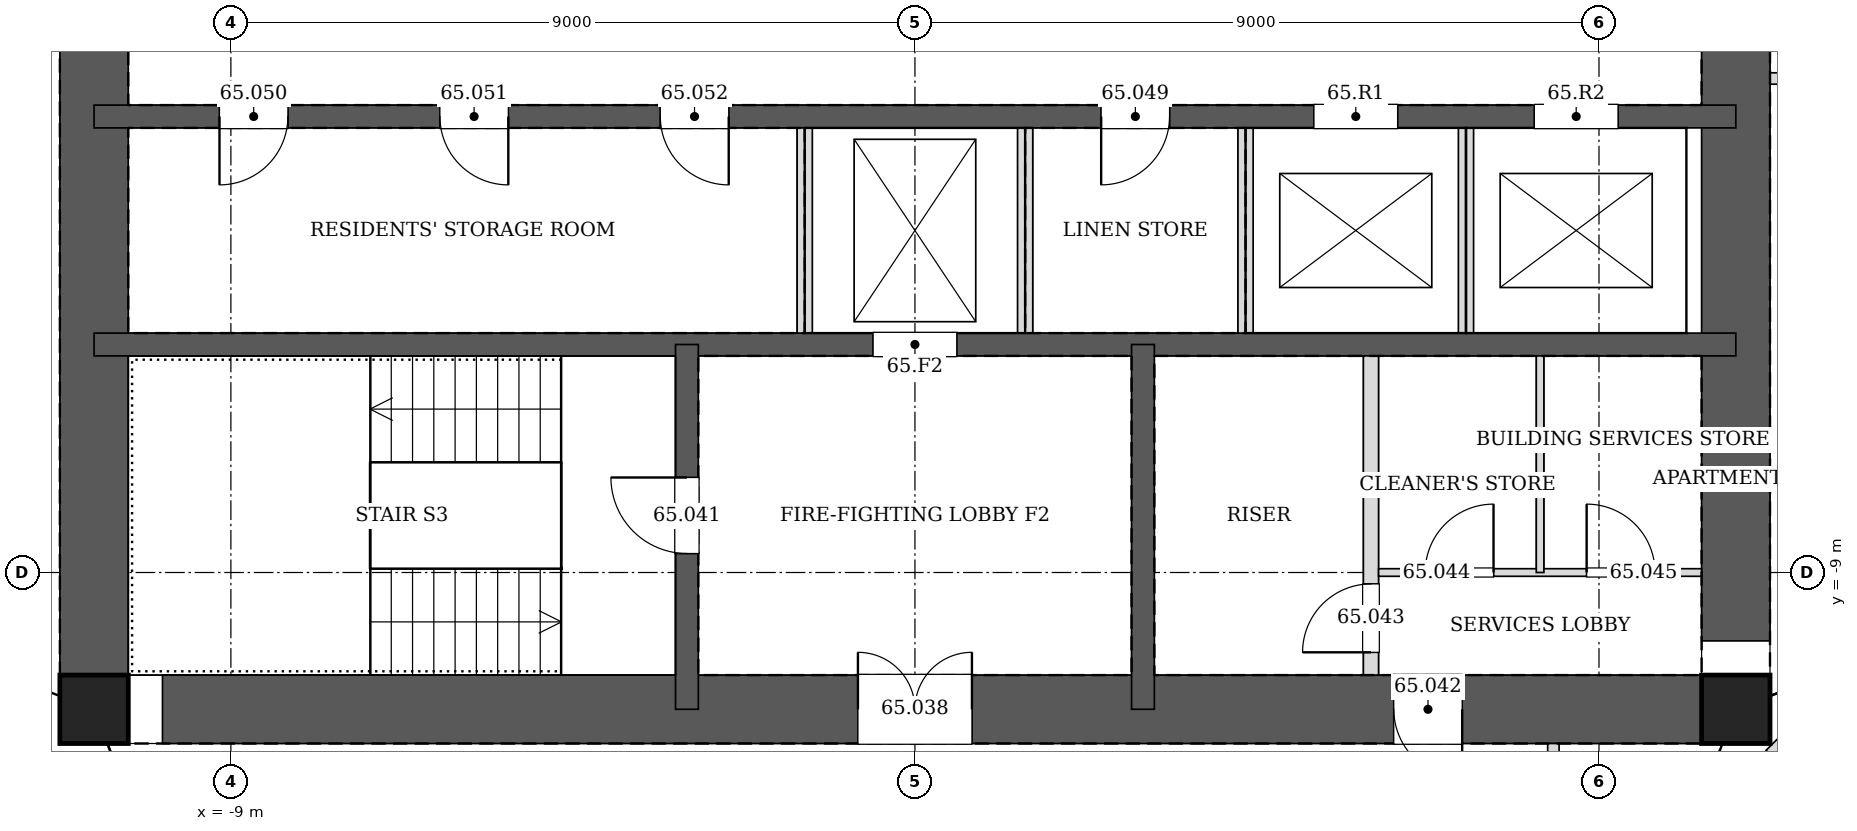
"""IFC4 building model, lengths in metres.
Left out: names, types, materials, properties, quantities, classifications, styles, units other than length and angle.
Written with IfcOpenShell. Run it as: python <this file> out.ifc"""

import sys

from ifc_helpers import new_model, si_unit, direction, frame, frame_2d, origin, origin_2d, place, context, subcontext, project, spatial, rectangle, hollow_rectangle, extrude, element, fill, save


model = new_model("IFC4")
c1 = context("Model", 3, precision=1e-05, world=origin(), true_north=direction((0.0, 1.0)))
c2 = subcontext(c1, "Body", "Model", "MODEL_VIEW")
j1 = project(units=[si_unit("LENGTHUNIT", "METRE"), si_unit("PLANEANGLEUNIT", "RADIAN")], contexts=[c1])
p1 = place(None, origin())
s1 = spatial("IfcSite", under=j1, at=p1, CompositionType="ELEMENT")
p2 = place(p1, origin())
s2 = spatial("IfcBuilding", under=s1, at=p2, CompositionType="ELEMENT")
p3 = place(p2, frame((0.0, 0.0, 270.8)))
s3 = spatial("IfcBuildingStorey", under=s2, at=p3, CompositionType="ELEMENT", Elevation=270.8)
for number, where, z_axis, x_axis in (
    (1, (-10.8, -10.8, 0.0), (0.0, 0.0, 1.0), (1.0, 0.0, 0.0)),
    (2, (10.8, -10.8, 0.0), (0.0, 0.0, 1.0), (1.0, 0.0, 0.0)),
):
    element("IfcColumn", number, at=place(p3, frame(where, z_axis=z_axis, x_axis=x_axis)), inside=s3, PredefinedType="COLUMN", context=c2, shape_type="SweptSolid", body=[
        extrude(hollow_rectangle(XDim=0.9, YDim=0.9, WallThickness=0.04, at=origin_2d()), origin(), (0.0, 0.0, 1.0), 3.4),
    ])
p4 = place(p3, frame((-10.8, -10.8, 0.0), z_axis=(0.0, 0.0, 1.0), x_axis=(1.0, 0.0, 0.0)))
e3 = element("IfcWall", 3, at=p4, inside=s3, PredefinedType="SOLIDWALL", context=c2, shape_type="SweptSolid", body=[
    extrude(rectangle(XDim=21.6, YDim=0.9, at=frame_2d((10.8, 0.0))), origin(), (0.0, 0.0, 1.0), 3.4),
])
p5 = place(p4, frame((10.05, 0.0, 0.0)))
e4 = element("IfcOpeningElement", 4, at=p5, cuts=e3, PredefinedType="OPENING", context=c2, shape_type="SweptSolid", body=[
    extrude(rectangle(XDim=1.5, YDim=2.1, at=frame_2d((0.75, 1.05))), frame((0.0, 0.46, 0.0), z_axis=(0.0, -1.0, 0.0), x_axis=(1.0, 0.0, 0.0)), (0.0, 0.0, 1.0), 0.92),
])
p6 = place(p4, frame((17.1, 0.0, 0.0)))
e5 = element("IfcOpeningElement", 5, at=p6, cuts=e3, PredefinedType="OPENING", context=c2, shape_type="SweptSolid", body=[
    extrude(rectangle(XDim=0.9, YDim=2.1, at=frame_2d((0.45, 1.05))), frame((0.0, 0.46, 0.0), z_axis=(0.0, -1.0, 0.0), x_axis=(1.0, 0.0, 0.0)), (0.0, 0.0, 1.0), 0.92),
])
p7 = place(p3, frame((10.8, -10.8, 0.0), z_axis=(0.0, 0.0, 1.0), x_axis=(0.0, 1.0, 0.0)))
e6 = element("IfcWall", 6, at=p7, inside=s3, PredefinedType="SOLIDWALL", context=c2, shape_type="SweptSolid", body=[
    extrude(rectangle(XDim=21.6, YDim=0.9, at=frame_2d((10.8, 0.0))), origin(), (0.0, 0.0, 1.0), 3.4),
])
p8 = place(p7, frame((11.7, 0.0, 0.0)))
e7 = element("IfcOpeningElement", 7, at=p8, cuts=e6, PredefinedType="OPENING", context=c2, shape_type="SweptSolid", body=[
    extrude(rectangle(XDim=1.2, YDim=2.1, at=frame_2d((0.6, 1.05))), frame((0.0, 0.46, 0.0), z_axis=(0.0, -1.0, 0.0), x_axis=(1.0, 0.0, 0.0)), (0.0, 0.0, 1.0), 0.92),
])
p9 = place(p7, frame((8.7, 0.0, 0.0)))
e8 = element("IfcOpeningElement", 8, at=p9, cuts=e6, PredefinedType="OPENING", context=c2, shape_type="SweptSolid", body=[
    extrude(rectangle(XDim=1.2, YDim=2.1, at=frame_2d((0.6, 1.05))), frame((0.0, 0.46, 0.0), z_axis=(0.0, -1.0, 0.0), x_axis=(1.0, 0.0, 0.0)), (0.0, 0.0, 1.0), 0.92),
])
p10 = place(p3, frame((-10.8, 10.8, 0.0), z_axis=(0.0, 0.0, 1.0), x_axis=(0.0, -1.0, 0.0)))
e9 = element("IfcWall", 9, at=p10, inside=s3, PredefinedType="SOLIDWALL", context=c2, shape_type="SweptSolid", body=[
    extrude(rectangle(XDim=21.6, YDim=0.9, at=frame_2d((10.8, 0.0))), origin(), (0.0, 0.0, 1.0), 3.4),
])
p11 = place(p10, frame((8.7, 0.0, 0.0)))
e10 = element("IfcOpeningElement", 10, at=p11, cuts=e9, PredefinedType="OPENING", context=c2, shape_type="SweptSolid", body=[
    extrude(rectangle(XDim=1.2, YDim=2.1, at=frame_2d((0.6, 1.05))), frame((0.0, 0.46, 0.0), z_axis=(0.0, -1.0, 0.0), x_axis=(1.0, 0.0, 0.0)), (0.0, 0.0, 1.0), 0.92),
])
p12 = place(p10, frame((11.7, 0.0, 0.0)))
e11 = element("IfcOpeningElement", 11, at=p12, cuts=e9, PredefinedType="OPENING", context=c2, shape_type="SweptSolid", body=[
    extrude(rectangle(XDim=1.2, YDim=2.1, at=frame_2d((0.6, 1.05))), frame((0.0, 0.46, 0.0), z_axis=(0.0, -1.0, 0.0), x_axis=(1.0, 0.0, 0.0)), (0.0, 0.0, 1.0), 0.92),
])
p13 = place(p3, frame((-10.8, -3.0, 0.0), z_axis=(0.0, 0.0, 1.0), x_axis=(1.0, 0.0, 0.0)))
e12 = element("IfcWall", 12, at=p13, inside=s3, PredefinedType="SOLIDWALL", context=c2, shape_type="SweptSolid", body=[
    extrude(rectangle(XDim=21.6, YDim=0.3, at=frame_2d((10.8, 0.0))), origin(), (0.0, 0.0, 1.0), 3.4),
])
p14 = place(p13, frame((13.25, 0.0, 0.0)))
e13 = element("IfcOpeningElement", 13, at=p14, cuts=e12, PredefinedType="OPENING", context=c2, shape_type="SweptSolid", body=[
    extrude(rectangle(XDim=0.9, YDim=2.1, at=frame_2d((0.45, 1.05))), frame((0.0, 0.16, 0.0), z_axis=(0.0, -1.0, 0.0), x_axis=(1.0, 0.0, 0.0)), (0.0, 0.0, 1.0), 0.32),
])
p15 = place(p13, frame((1.65, 0.0, 0.0)))
e14 = element("IfcOpeningElement", 14, at=p15, cuts=e12, PredefinedType="OPENING", context=c2, shape_type="SweptSolid", body=[
    extrude(rectangle(XDim=0.9, YDim=2.1, at=frame_2d((0.45, 1.05))), frame((0.0, 0.16, 0.0), z_axis=(0.0, -1.0, 0.0), x_axis=(1.0, 0.0, 0.0)), (0.0, 0.0, 1.0), 0.32),
])
p16 = place(p13, frame((4.55, 0.0, 0.0)))
e15 = element("IfcOpeningElement", 15, at=p16, cuts=e12, PredefinedType="OPENING", context=c2, shape_type="SweptSolid", body=[
    extrude(rectangle(XDim=0.9, YDim=2.1, at=frame_2d((0.45, 1.05))), frame((0.0, 0.16, 0.0), z_axis=(0.0, -1.0, 0.0), x_axis=(1.0, 0.0, 0.0)), (0.0, 0.0, 1.0), 0.32),
])
p17 = place(p13, frame((7.45, 0.0, 0.0)))
e16 = element("IfcOpeningElement", 16, at=p17, cuts=e12, PredefinedType="OPENING", context=c2, shape_type="SweptSolid", body=[
    extrude(rectangle(XDim=0.9, YDim=2.1, at=frame_2d((0.45, 1.05))), frame((0.0, 0.16, 0.0), z_axis=(0.0, -1.0, 0.0), x_axis=(1.0, 0.0, 0.0)), (0.0, 0.0, 1.0), 0.32),
])
p18 = place(p13, frame((16.05, 0.0, 0.0)))
e17 = element("IfcOpeningElement", 17, at=p18, cuts=e12, PredefinedType="OPENING", context=c2, shape_type="SweptSolid", body=[
    extrude(rectangle(XDim=1.1, YDim=2.1, at=frame_2d((0.55, 1.05))), frame((0.0, 0.16, 0.0), z_axis=(0.0, -1.0, 0.0), x_axis=(1.0, 0.0, 0.0)), (0.0, 0.0, 1.0), 0.32),
])
p19 = place(p13, frame((18.95, 0.0, 0.0)))
e18 = element("IfcOpeningElement", 18, at=p19, cuts=e12, PredefinedType="OPENING", context=c2, shape_type="SweptSolid", body=[
    extrude(rectangle(XDim=1.1, YDim=2.1, at=frame_2d((0.55, 1.05))), frame((0.0, 0.16, 0.0), z_axis=(0.0, -1.0, 0.0), x_axis=(1.0, 0.0, 0.0)), (0.0, 0.0, 1.0), 0.32),
])
p20 = place(p3, frame((-10.8, -6.0, 0.0), z_axis=(0.0, 0.0, 1.0), x_axis=(1.0, 0.0, 0.0)))
e19 = element("IfcWall", 19, at=p20, inside=s3, PredefinedType="SOLIDWALL", context=c2, shape_type="SweptSolid", body=[
    extrude(rectangle(XDim=21.6, YDim=0.3, at=frame_2d((10.8, 0.0))), origin(), (0.0, 0.0, 1.0), 3.4),
])
p21 = place(p20, frame((10.25, 0.0, 0.0)))
e20 = element("IfcOpeningElement", 20, at=p21, cuts=e19, PredefinedType="OPENING", context=c2, shape_type="SweptSolid", body=[
    extrude(rectangle(XDim=1.1, YDim=2.1, at=frame_2d((0.55, 1.05))), frame((0.0, 0.16, 0.0), z_axis=(0.0, -1.0, 0.0), x_axis=(1.0, 0.0, 0.0)), (0.0, 0.0, 1.0), 0.32),
])
p22 = place(p3, frame((-3.0, -6.0, 0.0), z_axis=(0.0, 0.0, 1.0), x_axis=(0.0, -1.0, 0.0)))
e21 = element("IfcWall", 21, at=p22, inside=s3, PredefinedType="SOLIDWALL", context=c2, shape_type="SweptSolid", body=[
    extrude(rectangle(XDim=4.8, YDim=0.3, at=frame_2d((2.4, 0.0))), origin(), (0.0, 0.0, 1.0), 3.4),
])
p23 = place(p22, frame((1.75, 0.0, 0.0)))
e22 = element("IfcOpeningElement", 22, at=p23, cuts=e21, PredefinedType="OPENING", context=c2, shape_type="SweptSolid", body=[
    extrude(rectangle(XDim=1.0, YDim=2.1, at=frame_2d((0.5, 1.05))), frame((0.0, 0.16, 0.0), z_axis=(0.0, -1.0, 0.0), x_axis=(1.0, 0.0, 0.0)), (0.0, 0.0, 1.0), 0.32),
])
p24 = place(p3, frame((3.0, -6.0, 0.0), z_axis=(0.0, 0.0, 1.0), x_axis=(0.0, -1.0, 0.0)))
e23 = element("IfcWall", 23, at=p24, inside=s3, PredefinedType="SOLIDWALL", context=c2, shape_type="SweptSolid", body=[
    extrude(rectangle(XDim=4.8, YDim=0.3, at=frame_2d((2.4, 0.0))), origin(), (0.0, 0.0, 1.0), 3.4),
])
p25 = place(p3, frame((11.25, -2.5, 0.0), z_axis=(0.0, 0.0, 1.0), x_axis=(1.0, 0.0, 0.0)))
e24 = element("IfcWall", 24, at=p25, inside=s3, PredefinedType="PARTITIONING", context=c2, shape_type="SweptSolid", body=[
    extrude(rectangle(XDim=1.8, YDim=0.15, at=frame_2d((0.9, 0.0))), origin(), (0.0, 0.0, 1.0), 3.2),
])
p26 = place(p25, frame((0.425, 0.0, 0.0)))
e25 = element("IfcOpeningElement", 25, at=p26, cuts=e24, PredefinedType="OPENING", context=c2, shape_type="SweptSolid", body=[
    extrude(rectangle(XDim=0.95, YDim=2.1, at=frame_2d((0.475, 1.05))), frame((0.0, 0.085, 0.0), z_axis=(0.0, -1.0, 0.0), x_axis=(1.0, 0.0, 0.0)), (0.0, 0.0, 1.0), 0.17),
])
p27 = place(p3, frame((8.4, -13.05, 0.0), z_axis=(0.0, 0.0, 1.0), x_axis=(0.0, 1.0, 0.0)))
e26 = element("IfcWall", 26, at=p27, inside=s3, PredefinedType="PARTITIONING", context=c2, shape_type="SweptSolid", body=[
    extrude(rectangle(XDim=1.8, YDim=0.15, at=frame_2d((0.9, 0.0))), origin(), (0.0, 0.0, 1.0), 3.2),
])
p28 = place(p27, frame((0.425, 0.0, 0.0)))
e27 = element("IfcOpeningElement", 27, at=p28, cuts=e26, PredefinedType="OPENING", context=c2, shape_type="SweptSolid", body=[
    extrude(rectangle(XDim=0.95, YDim=2.1, at=frame_2d((0.475, 1.05))), frame((0.0, 0.085, 0.0), z_axis=(0.0, -1.0, 0.0), x_axis=(1.0, 0.0, 0.0)), (0.0, 0.0, 1.0), 0.17),
])
p29 = place(p3, frame((13.586, -13.586, 0.0), z_axis=(0.0, 0.0, 1.0), x_axis=(-0.707106781187, 0.707106781187, 0.0)))
e28 = element("IfcWall", 28, at=p29, inside=s3, PredefinedType="PARTITIONING", context=c2, shape_type="SweptSolid", body=[
    extrude(rectangle(XDim=3.277, YDim=0.2, at=frame_2d((1.638, 0.0))), origin(), (0.0, 0.0, 1.0), 2.591),
])
for number, where, z_axis, x_axis in (
    (29, (-1.45, -5.85, 0.0), (0.0, 0.0, 1.0), (0.0, 1.0, 0.0)),
    (30, (1.45, -5.85, 0.0), (0.0, 0.0, 1.0), (0.0, 1.0, 0.0)),
    (31, (4.35, -5.85, 0.0), (0.0, 0.0, 1.0), (0.0, 1.0, 0.0)),
):
    element("IfcWall", number, at=place(p3, frame(where, z_axis=z_axis, x_axis=x_axis)), inside=s3, PredefinedType="PARTITIONING", context=c2, shape_type="SweptSolid", body=[
        extrude(rectangle(XDim=2.7, YDim=0.2, at=frame_2d((1.35, 0.0))), origin(), (0.0, 0.0, 1.0), 3.2),
    ])
p30 = place(p3, frame((7.25, -5.85, 0.0), z_axis=(0.0, 0.0, 1.0), x_axis=(0.0, 1.0, 0.0)))
e32 = element("IfcWall", 32, at=p30, inside=s3, PredefinedType="PARTITIONING", context=c2, shape_type="SweptSolid", body=[
    extrude(rectangle(XDim=2.7, YDim=0.2, at=frame_2d((1.35, 0.0))), origin(), (0.0, 0.0, 1.0), 3.4),
])
p31 = place(p3, frame((6.0, -10.35, 0.0), z_axis=(0.0, 0.0, 1.0), x_axis=(0.0, 1.0, 0.0)))
e33 = element("IfcWall", 33, at=p31, inside=s3, PredefinedType="PARTITIONING", context=c2, shape_type="SweptSolid", body=[
    extrude(rectangle(XDim=4.2, YDim=0.2, at=frame_2d((2.1, 0.0))), origin(), (0.0, 0.0, 1.0), 3.2),
])
p32 = place(p31, frame((0.3, 0.0, 0.0)))
e34 = element("IfcOpeningElement", 34, at=p32, cuts=e33, PredefinedType="OPENING", context=c2, shape_type="SweptSolid", body=[
    extrude(rectangle(XDim=0.9, YDim=2.1, at=frame_2d((0.45, 1.05))), frame((0.0, 0.11, 0.0), z_axis=(0.0, -1.0, 0.0), x_axis=(1.0, 0.0, 0.0)), (0.0, 0.0, 1.0), 0.22),
])
p33 = place(p3, frame((6.1, -9.0, 0.0), z_axis=(0.0, 0.0, 1.0), x_axis=(1.0, 0.0, 0.0)))
e35 = element("IfcWall", 35, at=p33, inside=s3, PredefinedType="PARTITIONING", context=c2, shape_type="SweptSolid", body=[
    extrude(rectangle(XDim=4.25, YDim=0.1, at=frame_2d((2.125, 0.0))), origin(), (0.0, 0.0, 1.0), 3.2),
])
p34 = place(p33, frame((0.613, 0.0, 0.0)))
e36 = element("IfcOpeningElement", 36, at=p34, cuts=e35, PredefinedType="OPENING", context=c2, shape_type="SweptSolid", body=[
    extrude(rectangle(XDim=0.9, YDim=2.1, at=frame_2d((0.45, 1.05))), frame((0.0, 0.06, 0.0), z_axis=(0.0, -1.0, 0.0), x_axis=(1.0, 0.0, 0.0)), (0.0, 0.0, 1.0), 0.12),
])
p35 = place(p33, frame((2.738, 0.0, 0.0)))
e37 = element("IfcOpeningElement", 37, at=p35, cuts=e35, PredefinedType="OPENING", context=c2, shape_type="SweptSolid", body=[
    extrude(rectangle(XDim=0.9, YDim=2.1, at=frame_2d((0.45, 1.05))), frame((0.0, 0.06, 0.0), z_axis=(0.0, -1.0, 0.0), x_axis=(1.0, 0.0, 0.0)), (0.0, 0.0, 1.0), 0.12),
])
p36 = place(p3, frame((8.225, -9.0, 0.0), z_axis=(0.0, 0.0, 1.0), x_axis=(0.0, 1.0, 0.0)))
e38 = element("IfcWall", 38, at=p36, inside=s3, PredefinedType="PARTITIONING", context=c2, shape_type="SweptSolid", body=[
    extrude(rectangle(XDim=2.85, YDim=0.1, at=frame_2d((1.425, 0.0))), origin(), (0.0, 0.0, 1.0), 3.2),
])
p37 = place(p5, origin())
e39 = element("IfcDoor", 39, at=p37, inside=s3, OperationType="DOUBLE_DOOR_SINGLE_SWING", PredefinedType="DOOR", context=c2, shape_type="SweptSolid", body=[
    extrude(rectangle(XDim=1.5, YDim=2.1, at=frame_2d((0.75, 1.05))), frame((0.0, 0.025, 0.0), z_axis=(0.0, -1.0, 0.0), x_axis=(1.0, 0.0, 0.0)), (0.0, 0.0, 1.0), 0.05),
])
fill(e4, e39)
p38 = place(p23, frame((1.0, 0.0, 0.0), z_axis=(0.0, 0.0, 1.0), x_axis=(-1.0, 0.0, 0.0)))
e40 = element("IfcDoor", 40, at=p38, inside=s3, OperationType="SINGLE_SWING_RIGHT", PredefinedType="DOOR", context=c2, shape_type="SweptSolid", body=[
    extrude(rectangle(XDim=1.0, YDim=2.1, at=frame_2d((0.5, 1.05))), frame((0.0, 0.025, 0.0), z_axis=(0.0, -1.0, 0.0), x_axis=(1.0, 0.0, 0.0)), (0.0, 0.0, 1.0), 0.05),
])
fill(e22, e40)
p39 = place(p6, frame((0.9, 0.0, 0.0), z_axis=(0.0, 0.0, 1.0), x_axis=(-1.0, 0.0, 0.0)))
e41 = element("IfcDoor", 41, at=p39, inside=s3, OperationType="SINGLE_SWING_LEFT", PredefinedType="DOOR", context=c2, shape_type="SweptSolid", body=[
    extrude(rectangle(XDim=0.9, YDim=2.1, at=frame_2d((0.45, 1.05))), frame((0.0, 0.025, 0.0), z_axis=(0.0, -1.0, 0.0), x_axis=(1.0, 0.0, 0.0)), (0.0, 0.0, 1.0), 0.05),
])
fill(e5, e41)
p40 = place(p32, origin())
e42 = element("IfcDoor", 42, at=p40, inside=s3, OperationType="SINGLE_SWING_LEFT", PredefinedType="DOOR", context=c2, shape_type="SweptSolid", body=[
    extrude(rectangle(XDim=0.9, YDim=2.1, at=frame_2d((0.45, 1.05))), frame((0.0, 0.025, 0.0), z_axis=(0.0, -1.0, 0.0), x_axis=(1.0, 0.0, 0.0)), (0.0, 0.0, 1.0), 0.05),
])
fill(e34, e42)
p41 = place(p34, origin())
e43 = element("IfcDoor", 43, at=p41, inside=s3, OperationType="SINGLE_SWING_RIGHT", PredefinedType="DOOR", context=c2, shape_type="SweptSolid", body=[
    extrude(rectangle(XDim=0.9, YDim=2.1, at=frame_2d((0.45, 1.05))), frame((0.0, 0.025, 0.0), z_axis=(0.0, -1.0, 0.0), x_axis=(1.0, 0.0, 0.0)), (0.0, 0.0, 1.0), 0.05),
])
fill(e36, e43)
p42 = place(p35, origin())
e44 = element("IfcDoor", 44, at=p42, inside=s3, OperationType="SINGLE_SWING_LEFT", PredefinedType="DOOR", context=c2, shape_type="SweptSolid", body=[
    extrude(rectangle(XDim=0.9, YDim=2.1, at=frame_2d((0.45, 1.05))), frame((0.0, 0.025, 0.0), z_axis=(0.0, -1.0, 0.0), x_axis=(1.0, 0.0, 0.0)), (0.0, 0.0, 1.0), 0.05),
])
fill(e37, e44)
p43 = place(p14, frame((0.9, 0.0, 0.0), z_axis=(0.0, 0.0, 1.0), x_axis=(-1.0, 0.0, 0.0)))
e45 = element("IfcDoor", 45, at=p43, inside=s3, OperationType="SINGLE_SWING_RIGHT", PredefinedType="DOOR", context=c2, shape_type="SweptSolid", body=[
    extrude(rectangle(XDim=0.9, YDim=2.1, at=frame_2d((0.45, 1.05))), frame((0.0, 0.025, 0.0), z_axis=(0.0, -1.0, 0.0), x_axis=(1.0, 0.0, 0.0)), (0.0, 0.0, 1.0), 0.05),
])
fill(e13, e45)
p44 = place(p15, frame((0.9, 0.0, 0.0), z_axis=(0.0, 0.0, 1.0), x_axis=(-1.0, 0.0, 0.0)))
e46 = element("IfcDoor", 46, at=p44, inside=s3, OperationType="SINGLE_SWING_RIGHT", PredefinedType="DOOR", context=c2, shape_type="SweptSolid", body=[
    extrude(rectangle(XDim=0.9, YDim=2.1, at=frame_2d((0.45, 1.05))), frame((0.0, 0.025, 0.0), z_axis=(0.0, -1.0, 0.0), x_axis=(1.0, 0.0, 0.0)), (0.0, 0.0, 1.0), 0.05),
])
fill(e14, e46)
p45 = place(p16, frame((0.9, 0.0, 0.0), z_axis=(0.0, 0.0, 1.0), x_axis=(-1.0, 0.0, 0.0)))
e47 = element("IfcDoor", 47, at=p45, inside=s3, OperationType="SINGLE_SWING_LEFT", PredefinedType="DOOR", context=c2, shape_type="SweptSolid", body=[
    extrude(rectangle(XDim=0.9, YDim=2.1, at=frame_2d((0.45, 1.05))), frame((0.0, 0.025, 0.0), z_axis=(0.0, -1.0, 0.0), x_axis=(1.0, 0.0, 0.0)), (0.0, 0.0, 1.0), 0.05),
])
fill(e15, e47)
p46 = place(p17, frame((0.9, 0.0, 0.0), z_axis=(0.0, 0.0, 1.0), x_axis=(-1.0, 0.0, 0.0)))
e48 = element("IfcDoor", 48, at=p46, inside=s3, OperationType="SINGLE_SWING_LEFT", PredefinedType="DOOR", context=c2, shape_type="SweptSolid", body=[
    extrude(rectangle(XDim=0.9, YDim=2.1, at=frame_2d((0.45, 1.05))), frame((0.0, 0.025, 0.0), z_axis=(0.0, -1.0, 0.0), x_axis=(1.0, 0.0, 0.0)), (0.0, 0.0, 1.0), 0.05),
])
fill(e16, e48)
p47 = place(p21, origin())
e49 = element("IfcDoor", 49, at=p47, inside=s3, OperationType="DOUBLE_DOOR_SLIDING", PredefinedType="DOOR", context=c2, shape_type="SweptSolid", body=[
    extrude(rectangle(XDim=1.1, YDim=2.1, at=frame_2d((0.55, 1.05))), frame((0.0, 0.025, 0.0), z_axis=(0.0, -1.0, 0.0), x_axis=(1.0, 0.0, 0.0)), (0.0, 0.0, 1.0), 0.05),
])
fill(e20, e49)
p48 = place(p18, origin())
e50 = element("IfcDoor", 50, at=p48, inside=s3, OperationType="DOUBLE_DOOR_SLIDING", PredefinedType="DOOR", context=c2, shape_type="SweptSolid", body=[
    extrude(rectangle(XDim=1.1, YDim=2.1, at=frame_2d((0.55, 1.05))), frame((0.0, 0.025, 0.0), z_axis=(0.0, -1.0, 0.0), x_axis=(1.0, 0.0, 0.0)), (0.0, 0.0, 1.0), 0.05),
])
fill(e17, e50)
p49 = place(p19, origin())
e51 = element("IfcDoor", 51, at=p49, inside=s3, OperationType="DOUBLE_DOOR_SLIDING", PredefinedType="DOOR", context=c2, shape_type="SweptSolid", body=[
    extrude(rectangle(XDim=1.1, YDim=2.1, at=frame_2d((0.55, 1.05))), frame((0.0, 0.025, 0.0), z_axis=(0.0, -1.0, 0.0), x_axis=(1.0, 0.0, 0.0)), (0.0, 0.0, 1.0), 0.05),
])
fill(e18, e51)
save(model, sys.argv[1])
